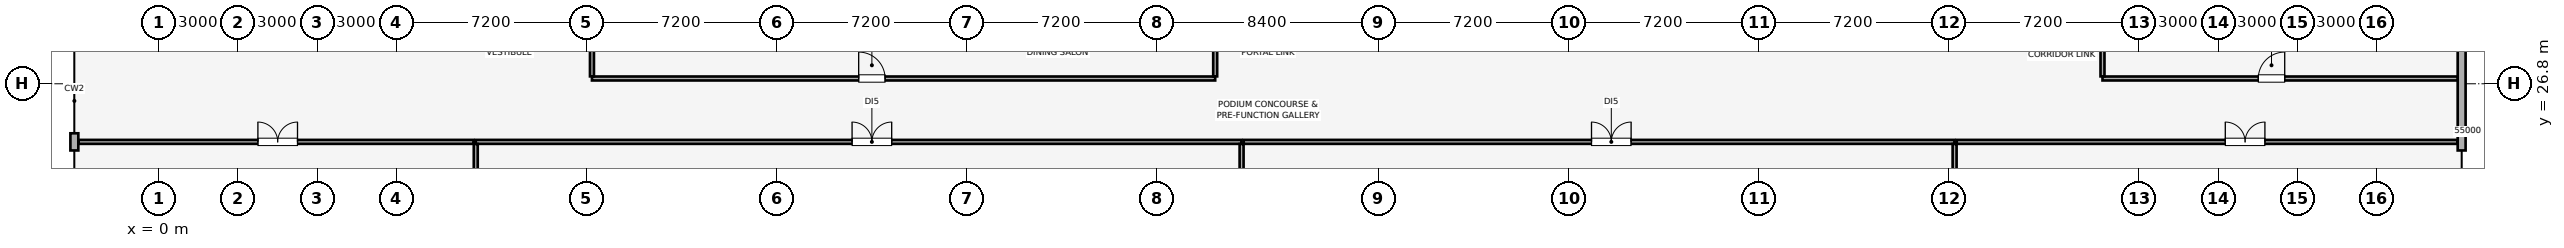
"""IFC4 building model, lengths in metres.
Left out: names, types, materials, properties, quantities, classifications, styles, units other than length and angle.
Written with IfcOpenShell. Run it as: python <this file> out.ifc"""

import sys

from ifc_helpers import new_model, si_unit, direction, frame, frame_2d, origin, place, context, subcontext, project, spatial, rectangle, extrude, element, fill, save


model = new_model("IFC4")
c1 = context("Model", 3, precision=1e-05, world=origin(), true_north=direction((0.0, 1.0)))
c2 = subcontext(c1, "Body", "Model", "MODEL_VIEW")
j1 = project(units=[si_unit("LENGTHUNIT", "METRE"), si_unit("PLANEANGLEUNIT", "RADIAN")], contexts=[c1])
p1 = place(None, origin())
s1 = spatial("IfcSite", under=j1, at=p1, CompositionType="ELEMENT")
p2 = place(p1, origin())
s2 = spatial("IfcBuilding", under=s1, at=p2, CompositionType="ELEMENT")
p3 = place(p2, frame((0.0, 0.0, 14.0)))
s3 = spatial("IfcBuildingStorey", under=s2, at=p3, CompositionType="ELEMENT", Elevation=14.0)
p4 = place(p3, frame((87.2, 24.275, 0.0), z_axis=(0.0, 0.0, 1.0), x_axis=(0.0, 1.0, 0.0)))
e1 = element("IfcWall", 1, at=p4, inside=s3, PredefinedType="SOLIDWALL", context=c2, shape_type="SweptSolid", body=[
    extrude(rectangle(XDim=24.625, YDim=0.3, at=frame_2d((12.312, 0.0))), origin(), (0.0, 0.0, 1.0), 4.13),
])
p5 = place(p4, frame((8.725, 0.0, 0.85)))
e2 = element("IfcOpeningElement", 2, at=p5, cuts=e1, PredefinedType="OPENING", context=c2, shape_type="SweptSolid", body=[
    extrude(rectangle(XDim=3.8, YDim=2.2, at=frame_2d((1.9, 1.1))), frame((0.0, 0.16, 0.0), z_axis=(0.0, -1.0, 0.0), x_axis=(1.0, 0.0, 0.0)), (0.0, 0.0, 1.0), 0.32),
])
p6 = place(p4, frame((16.625, 0.0, 0.85)))
e3 = element("IfcOpeningElement", 3, at=p6, cuts=e1, PredefinedType="OPENING", context=c2, shape_type="SweptSolid", body=[
    extrude(rectangle(XDim=3.8, YDim=2.2, at=frame_2d((1.9, 1.1))), frame((0.0, 0.16, 0.0), z_axis=(0.0, -1.0, 0.0), x_axis=(1.0, 0.0, 0.0)), (0.0, 0.0, 1.0), 0.32),
])
p7 = place(p3, frame((-3.2, 24.925, 0.0), z_axis=(0.0, 0.0, 1.0), x_axis=(0.0, -1.0, 0.0)))
e4 = element("IfcWall", 4, at=p7, inside=s3, PredefinedType="SOLIDWALL", context=c2, shape_type="SweptSolid", body=[
    extrude(rectangle(XDim=0.65, YDim=0.3, at=frame_2d((0.325, 0.0))), origin(), (0.0, 0.0, 1.0), 4.13),
])
p8 = place(p3, frame((73.6, 27.0, 0.0), z_axis=(0.0, 0.0, 1.0), x_axis=(1.0, 0.0, 0.0)))
e5 = element("IfcWall", 5, at=p8, inside=s3, PredefinedType="PARTITIONING", context=c2, shape_type="SweptSolid", body=[
    extrude(rectangle(XDim=13.445, YDim=0.15, at=frame_2d((6.722, 0.0))), origin(), (0.0, 0.0, 1.0), 5.08),
])
p9 = place(p8, frame((5.9, 0.0, 0.0)))
e6 = element("IfcOpeningElement", 6, at=p9, cuts=e5, PredefinedType="OPENING", context=c2, shape_type="SweptSolid", body=[
    extrude(rectangle(XDim=1.0, YDim=2.15, at=frame_2d((0.5, 1.075))), frame((0.0, 0.085, 0.0), z_axis=(0.0, -1.0, 0.0), x_axis=(1.0, 0.0, 0.0)), (0.0, 0.0, 1.0), 0.17),
])
p10 = place(p3, frame((73.6, 27.08, 0.0), z_axis=(0.0, 0.0, 1.0), x_axis=(0.0, 1.0, 0.0)))
e7 = element("IfcWall", 7, at=p10, inside=s3, PredefinedType="PARTITIONING", context=c2, shape_type="SweptSolid", body=[
    extrude(rectangle(XDim=3.44, YDim=0.15, at=frame_2d((1.72, 0.0))), origin(), (0.0, 0.0, 1.0), 5.08),
])
p11 = place(p3, frame((12.0, 24.6, 0.0), z_axis=(0.0, 0.0, 1.0), x_axis=(1.0, 0.0, 0.0)))
e8 = element("IfcWall", 8, at=p11, inside=s3, PredefinedType="PARTITIONING", context=c2, shape_type="SweptSolid", body=[
    extrude(rectangle(XDim=29.0, YDim=0.15, at=frame_2d((14.5, 0.0))), origin(), (0.0, 0.0, 1.0), 5.08),
])
p12 = place(p11, frame((14.25, 0.0, 0.0)))
e9 = element("IfcOpeningElement", 9, at=p12, cuts=e8, PredefinedType="OPENING", context=c2, shape_type="SweptSolid", body=[
    extrude(rectangle(XDim=1.5, YDim=2.25, at=frame_2d((0.75, 1.125))), frame((0.0, 0.085, 0.0), z_axis=(0.0, -1.0, 0.0), x_axis=(1.0, 0.0, 0.0)), (0.0, 0.0, 1.0), 0.17),
])
for number, where, z_axis, x_axis in (
    (10, (12.0, -2.345, 0.0), (0.0, 0.0, 1.0), (0.0, 1.0, 0.0)),
    (11, (41.0, -2.345, 0.0), (0.0, 0.0, 1.0), (0.0, 1.0, 0.0)),
):
    element("IfcWall", number, at=place(p3, frame(where, z_axis=z_axis, x_axis=x_axis)), inside=s3, PredefinedType="PARTITIONING", context=c2, shape_type="SweptSolid", body=[
        extrude(rectangle(XDim=26.865, YDim=0.15, at=frame_2d((13.433, 0.0))), origin(), (0.0, 0.0, 1.0), 5.08),
    ])
p13 = place(p3, frame((41.08, 24.6, 0.0), z_axis=(0.0, 0.0, 1.0), x_axis=(1.0, 0.0, 0.0)))
e12 = element("IfcWall", 12, at=p13, inside=s3, PredefinedType="PARTITIONING", context=c2, shape_type="SweptSolid", body=[
    extrude(rectangle(XDim=26.92, YDim=0.15, at=frame_2d((13.46, 0.0))), origin(), (0.0, 0.0, 1.0), 5.08),
])
p14 = place(p13, frame((13.17, 0.0, 0.0)))
e13 = element("IfcOpeningElement", 13, at=p14, cuts=e12, PredefinedType="OPENING", context=c2, shape_type="SweptSolid", body=[
    extrude(rectangle(XDim=1.5, YDim=2.25, at=frame_2d((0.75, 1.125))), frame((0.0, 0.085, 0.0), z_axis=(0.0, -1.0, 0.0), x_axis=(1.0, 0.0, 0.0)), (0.0, 0.0, 1.0), 0.17),
])
p15 = place(p3, frame((68.0, -2.345, 0.0), z_axis=(0.0, 0.0, 1.0), x_axis=(0.0, 1.0, 0.0)))
e14 = element("IfcWall", 14, at=p15, inside=s3, PredefinedType="PARTITIONING", context=c2, shape_type="SweptSolid", body=[
    extrude(rectangle(XDim=26.865, YDim=0.15, at=frame_2d((13.433, 0.0))), origin(), (0.0, 0.0, 1.0), 4.393),
])
p16 = place(p3, frame((16.4, 27.0, 0.0), z_axis=(0.0, 0.0, 1.0), x_axis=(1.0, 0.0, 0.0)))
e15 = element("IfcWall", 15, at=p16, inside=s3, PredefinedType="PARTITIONING", context=c2, shape_type="SweptSolid", body=[
    extrude(rectangle(XDim=23.6, YDim=0.15, at=frame_2d((11.8, 0.0))), origin(), (0.0, 0.0, 1.0), 5.08),
])
p17 = place(p16, frame((10.1, 0.0, 0.0)))
e16 = element("IfcOpeningElement", 16, at=p17, cuts=e15, PredefinedType="OPENING", context=c2, shape_type="SweptSolid", body=[
    extrude(rectangle(XDim=1.0, YDim=2.15, at=frame_2d((0.5, 1.075))), frame((0.0, 0.085, 0.0), z_axis=(0.0, -1.0, 0.0), x_axis=(1.0, 0.0, 0.0)), (0.0, 0.0, 1.0), 0.17),
])
p18 = place(p3, frame((16.4, 27.08, 0.0), z_axis=(0.0, 0.0, 1.0), x_axis=(0.0, 1.0, 0.0)))
e17 = element("IfcWall", 17, at=p18, inside=s3, PredefinedType="PARTITIONING", context=c2, shape_type="SweptSolid", body=[
    extrude(rectangle(XDim=2.31, YDim=0.15, at=frame_2d((1.155, 0.0))), origin(), (0.0, 0.0, 1.0), 4.48),
])
p19 = place(p3, frame((40.0, 27.08, 0.0), z_axis=(0.0, 0.0, 1.0), x_axis=(0.0, 1.0, 0.0)))
e18 = element("IfcWall", 18, at=p19, inside=s3, PredefinedType="PARTITIONING", context=c2, shape_type="SweptSolid", body=[
    extrude(rectangle(XDim=2.24, YDim=0.15, at=frame_2d((1.12, 0.0))), origin(), (0.0, 0.0, 1.0), 5.08),
])
p20 = place(p3, frame((-3.045, 24.6, 0.0), z_axis=(0.0, 0.0, 1.0), x_axis=(1.0, 0.0, 0.0)))
e19 = element("IfcWall", 19, at=p20, inside=s3, PredefinedType="PARTITIONING", context=c2, shape_type="SweptSolid", body=[
    extrude(rectangle(XDim=14.965, YDim=0.15, at=frame_2d((7.482, 0.0))), origin(), (0.0, 0.0, 1.0), 5.08),
])
p21 = place(p20, frame((6.795, 0.0, 0.0)))
e20 = element("IfcOpeningElement", 20, at=p21, cuts=e19, PredefinedType="OPENING", context=c2, shape_type="SweptSolid", body=[
    extrude(rectangle(XDim=1.5, YDim=2.25, at=frame_2d((0.75, 1.125))), frame((0.0, 0.085, 0.0), z_axis=(0.0, -1.0, 0.0), x_axis=(1.0, 0.0, 0.0)), (0.0, 0.0, 1.0), 0.17),
])
p22 = place(p3, frame((68.08, 24.6, 0.0), z_axis=(0.0, 0.0, 1.0), x_axis=(1.0, 0.0, 0.0)))
e21 = element("IfcWall", 21, at=p22, inside=s3, PredefinedType="PARTITIONING", context=c2, shape_type="SweptSolid", body=[
    extrude(rectangle(XDim=18.965, YDim=0.15, at=frame_2d((9.482, 0.0))), origin(), (0.0, 0.0, 1.0), 5.08),
])
p23 = place(p22, frame((10.17, 0.0, 0.0)))
e22 = element("IfcOpeningElement", 22, at=p23, cuts=e21, PredefinedType="OPENING", context=c2, shape_type="SweptSolid", body=[
    extrude(rectangle(XDim=1.5, YDim=2.25, at=frame_2d((0.75, 1.125))), frame((0.0, 0.085, 0.0), z_axis=(0.0, -1.0, 0.0), x_axis=(1.0, 0.0, 0.0)), (0.0, 0.0, 1.0), 0.17),
])
p24 = place(p9, origin())
e23 = element("IfcDoor", 23, at=p24, inside=s3, OperationType="SINGLE_SWING_RIGHT", PredefinedType="DOOR", context=c2, shape_type="SweptSolid", body=[
    extrude(rectangle(XDim=1.0, YDim=2.15, at=frame_2d((0.5, 1.075))), frame((0.0, 0.025, 0.0), z_axis=(0.0, -1.0, 0.0), x_axis=(1.0, 0.0, 0.0)), (0.0, 0.0, 1.0), 0.05),
])
fill(e6, e23)
p25 = place(p12, origin())
e24 = element("IfcDoor", 24, at=p25, inside=s3, OperationType="DOUBLE_DOOR_SINGLE_SWING", PredefinedType="DOOR", context=c2, shape_type="SweptSolid", body=[
    extrude(rectangle(XDim=1.5, YDim=2.25, at=frame_2d((0.75, 1.125))), frame((0.0, 0.025, 0.0), z_axis=(0.0, -1.0, 0.0), x_axis=(1.0, 0.0, 0.0)), (0.0, 0.0, 1.0), 0.05),
])
fill(e9, e24)
p26 = place(p14, origin())
e25 = element("IfcDoor", 25, at=p26, inside=s3, OperationType="DOUBLE_DOOR_SINGLE_SWING", PredefinedType="DOOR", context=c2, shape_type="SweptSolid", body=[
    extrude(rectangle(XDim=1.5, YDim=2.25, at=frame_2d((0.75, 1.125))), frame((0.0, 0.025, 0.0), z_axis=(0.0, -1.0, 0.0), x_axis=(1.0, 0.0, 0.0)), (0.0, 0.0, 1.0), 0.05),
])
fill(e13, e25)
p27 = place(p17, origin())
e26 = element("IfcDoor", 26, at=p27, inside=s3, OperationType="SINGLE_SWING_LEFT", PredefinedType="DOOR", context=c2, shape_type="SweptSolid", body=[
    extrude(rectangle(XDim=1.0, YDim=2.15, at=frame_2d((0.5, 1.075))), frame((0.0, 0.025, 0.0), z_axis=(0.0, -1.0, 0.0), x_axis=(1.0, 0.0, 0.0)), (0.0, 0.0, 1.0), 0.05),
])
fill(e16, e26)
p28 = place(p21, origin())
e27 = element("IfcDoor", 27, at=p28, inside=s3, OperationType="DOUBLE_DOOR_SINGLE_SWING", PredefinedType="DOOR", context=c2, shape_type="SweptSolid", body=[
    extrude(rectangle(XDim=1.5, YDim=2.25, at=frame_2d((0.75, 1.125))), frame((0.0, 0.025, 0.0), z_axis=(0.0, -1.0, 0.0), x_axis=(1.0, 0.0, 0.0)), (0.0, 0.0, 1.0), 0.05),
])
fill(e20, e27)
p29 = place(p23, origin())
e28 = element("IfcDoor", 28, at=p29, inside=s3, OperationType="DOUBLE_DOOR_SINGLE_SWING", PredefinedType="DOOR", context=c2, shape_type="SweptSolid", body=[
    extrude(rectangle(XDim=1.5, YDim=2.25, at=frame_2d((0.75, 1.125))), frame((0.0, 0.025, 0.0), z_axis=(0.0, -1.0, 0.0), x_axis=(1.0, 0.0, 0.0)), (0.0, 0.0, 1.0), 0.05),
])
fill(e22, e28)
save(model, sys.argv[1])
